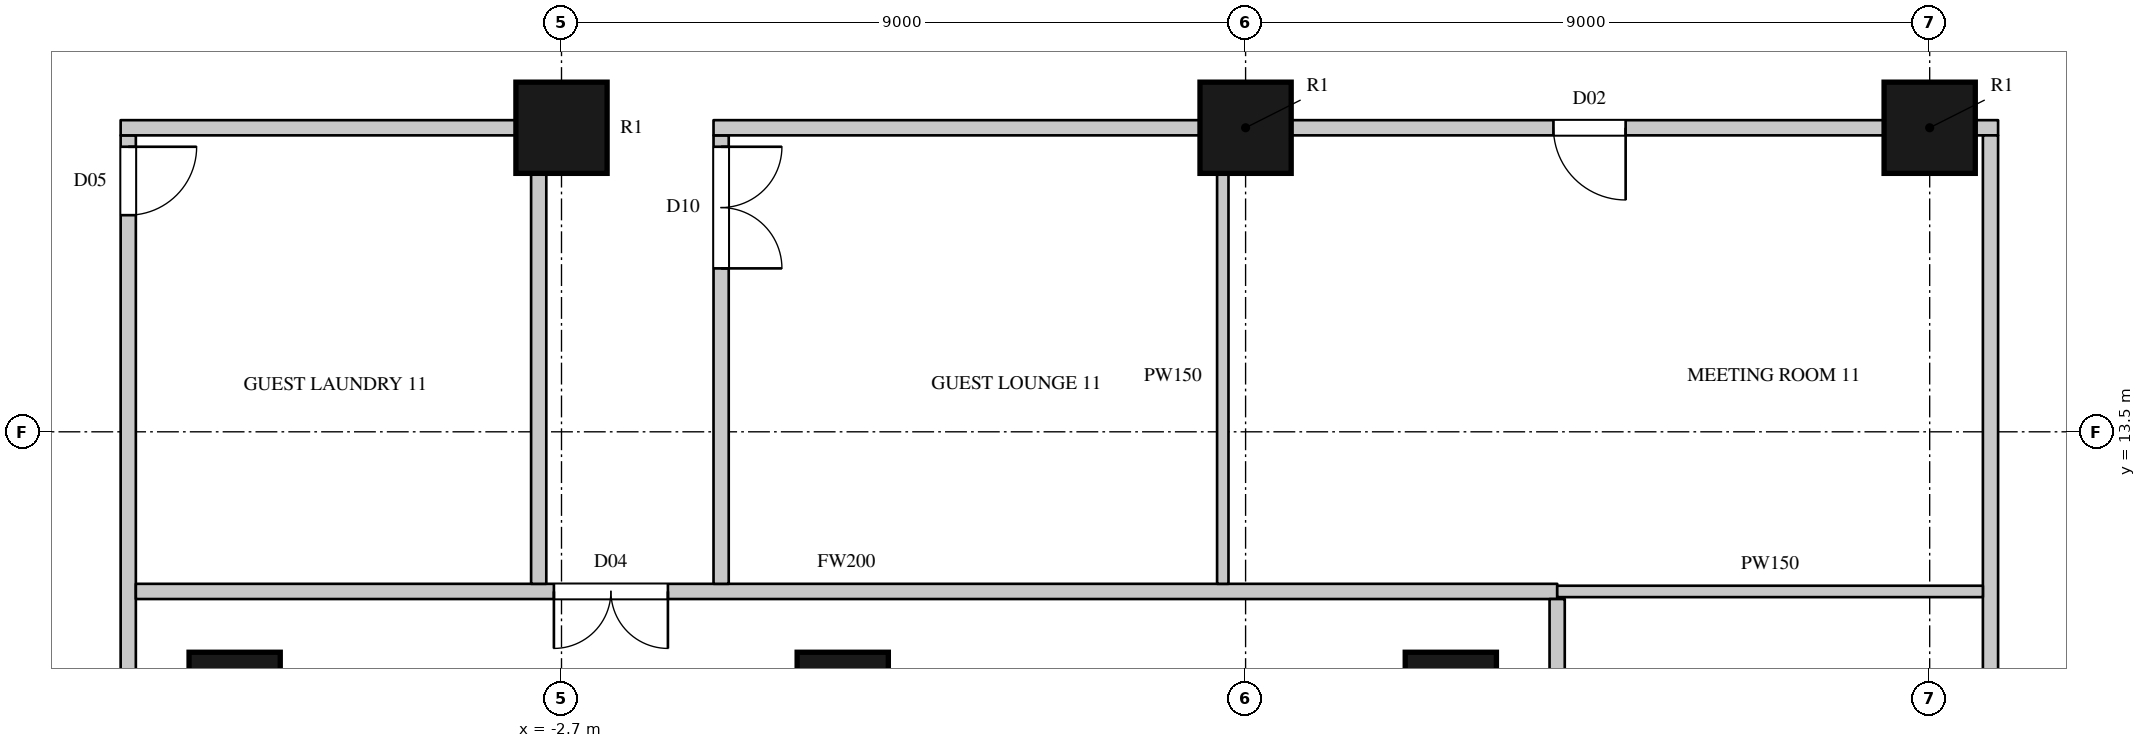
"""IFC4 building model, lengths in metres.
Left out: names, types, materials, properties, quantities, classifications, styles, units other than length and angle.
Written with IfcOpenShell. Run it as: python <this file> out.ifc"""

import sys

from ifc_helpers import new_model, si_unit, direction, frame, frame_2d, origin, origin_2d, place, context, subcontext, project, spatial, rectangle, circle, extrude, element, fill, save


model = new_model("IFC4")
c1 = context("Model", 3, precision=1e-05, world=origin(), true_north=direction((0.0, 1.0)))
c2 = subcontext(c1, "Body", "Model", "MODEL_VIEW")
j1 = project(units=[si_unit("LENGTHUNIT", "METRE"), si_unit("PLANEANGLEUNIT", "RADIAN")], contexts=[c1])
p1 = place(None, origin())
s1 = spatial("IfcSite", under=j1, at=p1, CompositionType="ELEMENT")
p2 = place(p1, origin())
s2 = spatial("IfcBuilding", under=s1, at=p2, CompositionType="ELEMENT")
p3 = place(p2, frame((0.0, 0.0, 69.9)))
s3 = spatial("IfcBuildingStorey", under=s2, at=p3, CompositionType="ELEMENT", Elevation=69.9)
for number, where, z_axis, x_axis in (
    (1, (-2.7, 17.5, 0.0), (0.0, 0.0, 1.0), (1.0, 0.0, 0.0)),
    (2, (6.3, 17.5, 0.0), (0.0, 0.0, 1.0), (1.0, 0.0, 0.0)),
    (3, (15.3, 17.5, 0.0), (0.0, 0.0, 1.0), (1.0, 0.0, 0.0)),
    (4, (-7.0, 10.0, 0.0), (0.0, 0.0, 1.0), (1.0, 0.0, 0.0)),
    (5, (1.0, 10.0, 0.0), (0.0, 0.0, 1.0), (1.0, 0.0, 0.0)),
    (6, (9.0, 10.0, 0.0), (0.0, 0.0, 1.0), (1.0, 0.0, 0.0)),
):
    element("IfcColumn", number, at=place(p3, frame(where, z_axis=z_axis, x_axis=x_axis)), inside=s3, PredefinedType="COLUMN", context=c2, shape_type="SweptSolid", body=[
        extrude(circle(Radius=0.6, at=origin_2d()), origin(), (0.0, 0.0, 1.0), 3.6),
    ])
p4 = place(p3, frame((-8.4, -17.4, 0.0), z_axis=(0.0, 0.0, 1.0), x_axis=(0.0, 1.0, 0.0)))
e7 = element("IfcWall", 7, at=p4, inside=s3, PredefinedType="PARTITIONING", context=c2, shape_type="SweptSolid", body=[
    extrude(rectangle(XDim=34.8, YDim=0.2, at=frame_2d((17.4, 0.0))), origin(), (0.0, 0.0, 1.0), 3.3),
])
p5 = place(p4, frame((21.15, 0.0, 0.0)))
e8 = element("IfcOpeningElement", 8, at=p5, cuts=e7, PredefinedType="OPENING", context=c2, shape_type="SweptSolid", body=[
    extrude(rectangle(XDim=1.5, YDim=2.2, at=frame_2d((0.75, 1.1))), frame((0.0, 0.11, 0.0), z_axis=(0.0, -1.0, 0.0), x_axis=(1.0, 0.0, 0.0)), (0.0, 0.0, 1.0), 0.22),
])
p6 = place(p4, frame((33.75, 0.0, 0.0)))
e9 = element("IfcOpeningElement", 9, at=p6, cuts=e7, PredefinedType="OPENING", context=c2, shape_type="SweptSolid", body=[
    extrude(rectangle(XDim=0.9, YDim=2.2, at=frame_2d((0.45, 1.1))), frame((0.0, 0.11, 0.0), z_axis=(0.0, -1.0, 0.0), x_axis=(1.0, 0.0, 0.0)), (0.0, 0.0, 1.0), 0.22),
])
p7 = place(p4, frame((0.15, 0.0, 0.0)))
e10 = element("IfcOpeningElement", 10, at=p7, cuts=e7, PredefinedType="OPENING", context=c2, shape_type="SweptSolid", body=[
    extrude(rectangle(XDim=0.95, YDim=2.2, at=frame_2d((0.475, 1.1))), frame((0.0, 0.11, 0.0), z_axis=(0.0, -1.0, 0.0), x_axis=(1.0, 0.0, 0.0)), (0.0, 0.0, 1.0), 0.22),
])
p8 = place(p3, frame((-8.3, 11.4, 0.0), z_axis=(0.0, 0.0, 1.0), x_axis=(1.0, 0.0, 0.0)))
e11 = element("IfcWall", 11, at=p8, inside=s3, PredefinedType="PARTITIONING", context=c2, shape_type="SweptSolid", body=[
    extrude(rectangle(XDim=18.7, YDim=0.2, at=frame_2d((9.35, 0.0))), origin(), (0.0, 0.0, 1.0), 3.3),
])
p9 = place(p8, frame((5.5, 0.0, 0.0)))
e12 = element("IfcOpeningElement", 12, at=p9, cuts=e11, PredefinedType="OPENING", context=c2, shape_type="SweptSolid", body=[
    extrude(rectangle(XDim=1.5, YDim=2.2, at=frame_2d((0.75, 1.1))), frame((0.0, 0.11, 0.0), z_axis=(0.0, -1.0, 0.0), x_axis=(1.0, 0.0, 0.0)), (0.0, 0.0, 1.0), 0.22),
])
p10 = place(p3, frame((-8.5, 17.5, 0.0), z_axis=(0.0, 0.0, 1.0), x_axis=(1.0, 0.0, 0.0)))
e13 = element("IfcWall", 13, at=p10, inside=s3, PredefinedType="PARTITIONING", context=c2, shape_type="SweptSolid", body=[
    extrude(rectangle(XDim=5.2, YDim=0.2, at=frame_2d((2.6, 0.0))), origin(), (0.0, 0.0, 1.0), 2.75),
])
p11 = place(p3, frame((-3.0, 11.5, 0.0), z_axis=(0.0, 0.0, 1.0), x_axis=(0.0, 1.0, 0.0)))
e14 = element("IfcWall", 14, at=p11, inside=s3, PredefinedType="PARTITIONING", context=c2, shape_type="SweptSolid", body=[
    extrude(rectangle(XDim=5.443, YDim=0.2, at=frame_2d((2.722, 0.0))), origin(), (0.0, 0.0, 1.0), 3.3),
])
p12 = place(p3, frame((-0.6, 11.5, 0.0), z_axis=(0.0, 0.0, 1.0), x_axis=(0.0, 1.0, 0.0)))
e15 = element("IfcWall", 15, at=p12, inside=s3, PredefinedType="PARTITIONING", context=c2, shape_type="SweptSolid", body=[
    extrude(rectangle(XDim=5.9, YDim=0.2, at=frame_2d((2.95, 0.0))), origin(), (0.0, 0.0, 1.0), 3.3),
])
p13 = place(p12, frame((4.15, 0.0, 0.0)))
e16 = element("IfcOpeningElement", 16, at=p13, cuts=e15, PredefinedType="OPENING", context=c2, shape_type="SweptSolid", body=[
    extrude(rectangle(XDim=1.6, YDim=2.4, at=frame_2d((0.8, 1.2))), frame((0.0, 0.11, 0.0), z_axis=(0.0, -1.0, 0.0), x_axis=(1.0, 0.0, 0.0)), (0.0, 0.0, 1.0), 0.22),
])
p14 = place(p3, frame((-0.7, 17.5, 0.0), z_axis=(0.0, 0.0, 1.0), x_axis=(1.0, 0.0, 0.0)))
e17 = element("IfcWall", 17, at=p14, inside=s3, PredefinedType="PARTITIONING", context=c2, shape_type="SweptSolid", body=[
    extrude(rectangle(XDim=6.4, YDim=0.2, at=frame_2d((3.2, 0.0))), origin(), (0.0, 0.0, 1.0), 2.75),
])
p15 = place(p3, frame((6.9, 17.5, 0.0), z_axis=(0.0, 0.0, 1.0), x_axis=(1.0, 0.0, 0.0)))
e18 = element("IfcWall", 18, at=p15, inside=s3, PredefinedType="PARTITIONING", context=c2, shape_type="SweptSolid", body=[
    extrude(rectangle(XDim=7.8, YDim=0.2, at=frame_2d((3.9, 0.0))), origin(), (0.0, 0.0, 1.0), 2.75),
])
p16 = place(p15, frame((3.45, 0.0, 0.0)))
e19 = element("IfcOpeningElement", 19, at=p16, cuts=e18, PredefinedType="OPENING", context=c2, shape_type="SweptSolid", body=[
    extrude(rectangle(XDim=0.95, YDim=2.2, at=frame_2d((0.475, 1.1))), frame((0.0, 0.11, 0.0), z_axis=(0.0, -1.0, 0.0), x_axis=(1.0, 0.0, 0.0)), (0.0, 0.0, 1.0), 0.22),
])
p17 = place(p3, frame((15.9, 17.5, 0.0), z_axis=(0.0, 0.0, 1.0), x_axis=(1.0, 0.0, 0.0)))
e20 = element("IfcWall", 20, at=p17, inside=s3, PredefinedType="PARTITIONING", context=c2, shape_type="SweptSolid", body=[
    extrude(rectangle(XDim=0.3, YDim=0.2, at=frame_2d((0.15, 0.0))), origin(), (0.0, 0.0, 1.0), 3.3),
])
p18 = place(p3, frame((10.399, -12.5, 0.0), z_axis=(0.0, 0.0, 1.0), x_axis=(0.0, 1.0, 0.0)))
e21 = element("IfcWall", 21, at=p18, inside=s3, PredefinedType="PARTITIONING", context=c2, shape_type="SweptSolid", body=[
    extrude(rectangle(XDim=23.8, YDim=0.2, at=frame_2d((11.9, 0.0))), origin(), (0.0, 0.0, 1.0), 3.3),
])
p19 = place(p18, frame((6.0, 0.0, 0.0)))
e22 = element("IfcOpeningElement", 22, at=p19, cuts=e21, PredefinedType="OPENING", context=c2, shape_type="SweptSolid", body=[
    extrude(rectangle(XDim=1.5, YDim=2.2, at=frame_2d((0.75, 1.1))), frame((0.0, 0.11, 0.0), z_axis=(0.0, -1.0, 0.0), x_axis=(1.0, 0.0, 0.0)), (0.0, 0.0, 1.0), 0.22),
])
p20 = place(p18, frame((17.5, 0.0, 0.0)))
e23 = element("IfcOpeningElement", 23, at=p20, cuts=e21, PredefinedType="OPENING", context=c2, shape_type="SweptSolid", body=[
    extrude(rectangle(XDim=1.5, YDim=2.2, at=frame_2d((0.75, 1.1))), frame((0.0, 0.11, 0.0), z_axis=(0.0, -1.0, 0.0), x_axis=(1.0, 0.0, 0.0)), (0.0, 0.0, 1.0), 0.22),
])
p21 = place(p18, frame((7.7, 0.0, 0.0)))
e24 = element("IfcOpeningElement", 24, at=p21, cuts=e21, PredefinedType="OPENING", context=c2, shape_type="SweptSolid", body=[
    extrude(rectangle(XDim=1.5, YDim=2.2, at=frame_2d((0.75, 1.1))), frame((0.0, 0.11, 0.0), z_axis=(0.0, -1.0, 0.0), x_axis=(1.0, 0.0, 0.0)), (0.0, 0.0, 1.0), 0.22),
])
p22 = place(p18, frame((13.15, 0.0, 0.0)))
e25 = element("IfcOpeningElement", 25, at=p22, cuts=e21, PredefinedType="OPENING", context=c2, shape_type="SweptSolid", body=[
    extrude(rectangle(XDim=1.5, YDim=2.2, at=frame_2d((0.75, 1.1))), frame((0.0, 0.11, 0.0), z_axis=(0.0, -1.0, 0.0), x_axis=(1.0, 0.0, 0.0)), (0.0, 0.0, 1.0), 0.22),
])
p23 = place(p3, frame((16.1, 6.825, 0.0), z_axis=(0.0, 0.0, 1.0), x_axis=(0.0, 1.0, 0.0)))
e26 = element("IfcWall", 26, at=p23, inside=s3, PredefinedType="PARTITIONING", context=c2, shape_type="SweptSolid", body=[
    extrude(rectangle(XDim=10.575, YDim=0.2, at=frame_2d((5.288, 0.0))), origin(), (0.0, 0.0, 1.0), 3.3),
])
p24 = place(p3, frame((6.0, 11.5, 0.0), z_axis=(0.0, 0.0, 1.0), x_axis=(0.0, 1.0, 0.0)))
e27 = element("IfcWall", 27, at=p24, inside=s3, PredefinedType="PARTITIONING", context=c2, shape_type="SweptSolid", body=[
    extrude(rectangle(XDim=5.453, YDim=0.15, at=frame_2d((2.727, 0.0))), origin(), (0.0, 0.0, 1.0), 3.3),
])
p25 = place(p3, frame((10.4, 11.4, 0.0), z_axis=(0.0, 0.0, 1.0), x_axis=(1.0, 0.0, 0.0)))
e28 = element("IfcWall", 28, at=p25, inside=s3, PredefinedType="PARTITIONING", context=c2, shape_type="SweptSolid", body=[
    extrude(rectangle(XDim=5.6, YDim=0.15, at=frame_2d((2.8, 0.0))), origin(), (0.0, 0.0, 1.0), 3.3),
])
p26 = place(p9, origin())
e29 = element("IfcDoor", 29, at=p26, inside=s3, OperationType="DOUBLE_DOOR_SINGLE_SWING", PredefinedType="DOOR", context=c2, shape_type="SweptSolid", body=[
    extrude(rectangle(XDim=1.5, YDim=2.2, at=frame_2d((0.75, 1.1))), frame((0.0, 0.025, 0.0), z_axis=(0.0, -1.0, 0.0), x_axis=(1.0, 0.0, 0.0)), (0.0, 0.0, 1.0), 0.05),
])
fill(e12, e29)
p27 = place(p6, origin())
e30 = element("IfcDoor", 30, at=p27, inside=s3, OperationType="SINGLE_SWING_LEFT", PredefinedType="DOOR", context=c2, shape_type="SweptSolid", body=[
    extrude(rectangle(XDim=0.9, YDim=2.2, at=frame_2d((0.45, 1.1))), frame((0.0, 0.025, 0.0), z_axis=(0.0, -1.0, 0.0), x_axis=(1.0, 0.0, 0.0)), (0.0, 0.0, 1.0), 0.05),
])
fill(e9, e30)
p28 = place(p13, origin())
e31 = element("IfcDoor", 31, at=p28, inside=s3, OperationType="DOUBLE_DOOR_SINGLE_SWING", PredefinedType="DOOR", context=c2, shape_type="SweptSolid", body=[
    extrude(rectangle(XDim=1.6, YDim=2.4, at=frame_2d((0.8, 1.2))), frame((0.0, 0.025, 0.0), z_axis=(0.0, -1.0, 0.0), x_axis=(1.0, 0.0, 0.0)), (0.0, 0.0, 1.0), 0.05),
])
fill(e16, e31)
p29 = place(p16, origin())
e32 = element("IfcDoor", 32, at=p29, inside=s3, OperationType="SINGLE_SWING_LEFT", PredefinedType="DOOR", context=c2, shape_type="SweptSolid", body=[
    extrude(rectangle(XDim=0.95, YDim=2.2, at=frame_2d((0.475, 1.1))), frame((0.0, 0.025, 0.0), z_axis=(0.0, -1.0, 0.0), x_axis=(1.0, 0.0, 0.0)), (0.0, 0.0, 1.0), 0.05),
])
fill(e19, e32)
save(model, sys.argv[1])
